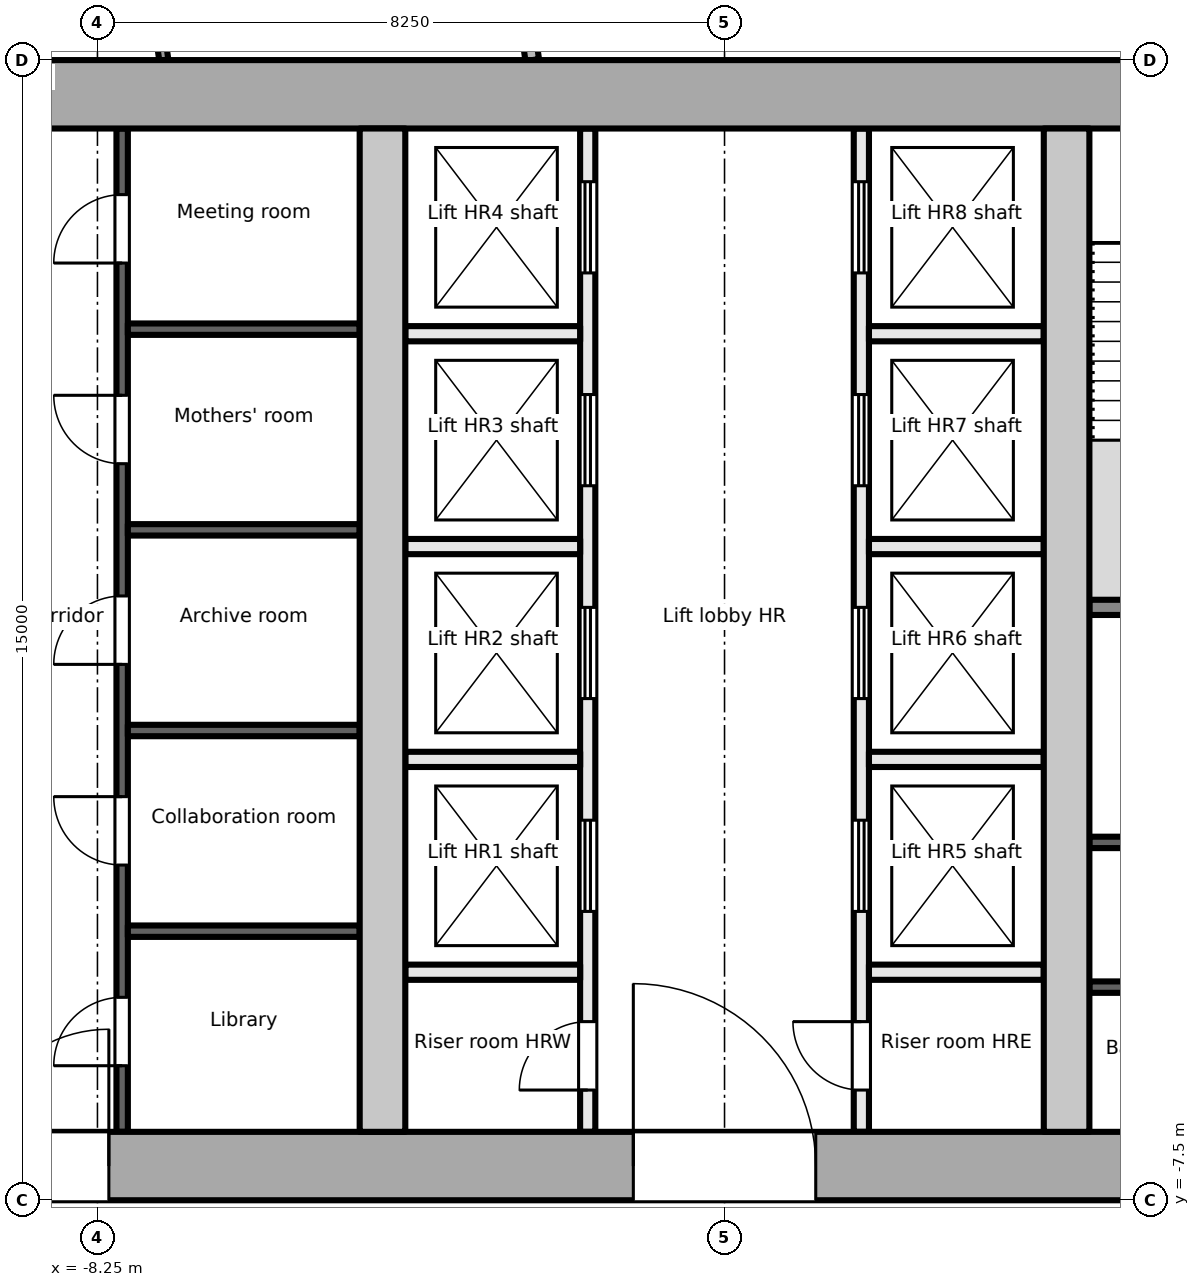
"""IFC4 building model, lengths in metres.
Left out: names, types, materials, properties, quantities, classifications, styles, units other than length and angle.
Written with IfcOpenShell. Run it as: python <this file> out.ifc"""

import sys

from ifc_helpers import new_model, si_unit, direction, frame, frame_2d, origin, place, context, subcontext, project, spatial, rectangle, extrude, element, fill, save


model = new_model("IFC4")
c1 = context("Model", 3, precision=1e-05, world=origin(), true_north=direction((0.0, 1.0)))
c2 = subcontext(c1, "Body", "Model", "MODEL_VIEW")
j1 = project(units=[si_unit("LENGTHUNIT", "METRE"), si_unit("PLANEANGLEUNIT", "RADIAN")], contexts=[c1])
p1 = place(None, origin())
s1 = spatial("IfcSite", under=j1, at=p1, CompositionType="ELEMENT")
p2 = place(p1, origin())
s2 = spatial("IfcBuilding", under=s1, at=p2, CompositionType="ELEMENT")
p3 = place(p2, frame((0.0, 0.0, 225.2)))
s3 = spatial("IfcBuildingStorey", under=s2, at=p3, CompositionType="ELEMENT", Elevation=225.2)
p4 = place(p3, frame((-18.0, -7.05, -0.2), z_axis=(0.0, 0.0, 1.0), x_axis=(1.0, 0.0, 0.0)))
e1 = element("IfcWall", 1, at=p4, inside=s3, PredefinedType="SHEAR", context=c2, shape_type="SweptSolid", body=[
    extrude(rectangle(XDim=36.0, YDim=0.9, at=frame_2d((18.0, 0.0))), origin(), (0.0, 0.0, 1.0), 3.9),
])
p5 = place(p4, frame((8.1, 0.0, 0.2)))
e2 = element("IfcOpeningElement", 2, at=p5, cuts=e1, PredefinedType="OPENING", context=c2, shape_type="SweptSolid", body=[
    extrude(rectangle(XDim=1.8, YDim=2.1, at=frame_2d((0.9, 1.05))), frame((0.0, 0.46, 0.0), z_axis=(0.0, -1.0, 0.0), x_axis=(1.0, 0.0, 0.0)), (0.0, 0.0, 1.0), 0.921),
])
p6 = place(p4, frame((16.8, 0.0, 0.2)))
e3 = element("IfcOpeningElement", 3, at=p6, cuts=e1, PredefinedType="OPENING", context=c2, shape_type="SweptSolid", body=[
    extrude(rectangle(XDim=2.4, YDim=2.1, at=frame_2d((1.2, 1.05))), frame((0.0, 0.46, 0.0), z_axis=(0.0, -1.0, 0.0), x_axis=(1.0, 0.0, 0.0)), (0.0, 0.0, 1.0), 0.921),
])
p7 = place(p4, frame((26.1, 0.0, 0.2)))
e4 = element("IfcOpeningElement", 4, at=p7, cuts=e1, PredefinedType="OPENING", context=c2, shape_type="SweptSolid", body=[
    extrude(rectangle(XDim=2.4, YDim=2.1, at=frame_2d((1.2, 1.05))), frame((0.0, 0.46, 0.0), z_axis=(0.0, -1.0, 0.0), x_axis=(1.0, 0.0, 0.0)), (0.0, 0.0, 1.0), 0.921),
])
p8 = place(p3, frame((-18.0, 7.05, -0.2), z_axis=(0.0, 0.0, 1.0), x_axis=(1.0, 0.0, 0.0)))
e5 = element("IfcWall", 5, at=p8, inside=s3, PredefinedType="SHEAR", context=c2, shape_type="SweptSolid", body=[
    extrude(rectangle(XDim=36.0, YDim=0.9, at=frame_2d((18.0, 0.0))), origin(), (0.0, 0.0, 1.0), 3.9),
])
for number, where, z_axis, x_axis in (
    (6, (-4.5, -6.6, -0.2), (0.0, 0.0, 1.0), (0.0, 1.0, 0.0)),
    (7, (4.5, -6.6, -0.2), (0.0, 0.0, 1.0), (0.0, 1.0, 0.0)),
):
    element("IfcWall", number, at=place(p3, frame(where, z_axis=z_axis, x_axis=x_axis)), inside=s3, PredefinedType="SHEAR", context=c2, shape_type="SweptSolid", body=[
        extrude(rectangle(XDim=13.2, YDim=0.6, at=frame_2d((6.6, 0.0))), origin(), (0.0, 0.0, 1.0), 3.9),
    ])
p9 = place(p3, frame((-7.925, -6.6, 0.0), z_axis=(0.0, 0.0, 1.0), x_axis=(0.0, 1.0, 0.0)))
e8 = element("IfcWall", 8, at=p9, inside=s3, PredefinedType="PARTITIONING", context=c2, shape_type="SweptSolid", body=[
    extrude(rectangle(XDim=13.2, YDim=0.15, at=frame_2d((6.6, 0.0))), origin(), (0.0, 0.0, 1.0), 3.7),
])
p10 = place(p9, frame((0.87, 0.0, 0.0)))
e9 = element("IfcOpeningElement", 9, at=p10, cuts=e8, PredefinedType="OPENING", context=c2, shape_type="SweptSolid", body=[
    extrude(rectangle(XDim=0.9, YDim=2.1, at=frame_2d((0.45, 1.05))), frame((0.0, 0.085, 0.0), z_axis=(0.0, -1.0, 0.0), x_axis=(1.0, 0.0, 0.0)), (0.0, 0.0, 1.0), 0.171),
])
p11 = place(p9, frame((3.51, 0.0, 0.0)))
e10 = element("IfcOpeningElement", 10, at=p11, cuts=e8, PredefinedType="OPENING", context=c2, shape_type="SweptSolid", body=[
    extrude(rectangle(XDim=0.9, YDim=2.1, at=frame_2d((0.45, 1.05))), frame((0.0, 0.085, 0.0), z_axis=(0.0, -1.0, 0.0), x_axis=(1.0, 0.0, 0.0)), (0.0, 0.0, 1.0), 0.171),
])
p12 = place(p9, frame((6.15, 0.0, 0.0)))
e11 = element("IfcOpeningElement", 11, at=p12, cuts=e8, PredefinedType="OPENING", context=c2, shape_type="SweptSolid", body=[
    extrude(rectangle(XDim=0.9, YDim=2.1, at=frame_2d((0.45, 1.05))), frame((0.0, 0.085, 0.0), z_axis=(0.0, -1.0, 0.0), x_axis=(1.0, 0.0, 0.0)), (0.0, 0.0, 1.0), 0.171),
])
p13 = place(p9, frame((8.79, 0.0, 0.0)))
e12 = element("IfcOpeningElement", 12, at=p13, cuts=e8, PredefinedType="OPENING", context=c2, shape_type="SweptSolid", body=[
    extrude(rectangle(XDim=0.9, YDim=2.1, at=frame_2d((0.45, 1.05))), frame((0.0, 0.085, 0.0), z_axis=(0.0, -1.0, 0.0), x_axis=(1.0, 0.0, 0.0)), (0.0, 0.0, 1.0), 0.171),
])
p14 = place(p9, frame((11.43, 0.0, 0.0)))
e13 = element("IfcOpeningElement", 13, at=p14, cuts=e8, PredefinedType="OPENING", context=c2, shape_type="SweptSolid", body=[
    extrude(rectangle(XDim=0.9, YDim=2.1, at=frame_2d((0.45, 1.05))), frame((0.0, 0.085, 0.0), z_axis=(0.0, -1.0, 0.0), x_axis=(1.0, 0.0, 0.0)), (0.0, 0.0, 1.0), 0.171),
])
for number, where, z_axis, x_axis in (
    (14, (-7.85, -3.96, 0.0), (0.0, 0.0, 1.0), (1.0, 0.0, 0.0)),
    (15, (-7.85, -1.32, 0.0), (0.0, 0.0, 1.0), (1.0, 0.0, 0.0)),
    (16, (-7.85, 1.32, 0.0), (0.0, 0.0, 1.0), (1.0, 0.0, 0.0)),
    (17, (-7.85, 3.96, 0.0), (0.0, 0.0, 1.0), (1.0, 0.0, 0.0)),
):
    element("IfcWall", number, at=place(p3, frame(where, z_axis=z_axis, x_axis=x_axis)), inside=s3, PredefinedType="PARTITIONING", context=c2, shape_type="SweptSolid", body=[
        extrude(rectangle(XDim=3.05, YDim=0.15, at=frame_2d((1.525, 0.0))), origin(), (0.0, 0.0, 1.0), 3.7),
    ])
p15 = place(p3, frame((-1.8, -6.6, 0.0), z_axis=(0.0, 0.0, 1.0), x_axis=(0.0, 1.0, 0.0)))
e18 = element("IfcWall", 18, at=p15, inside=s3, PredefinedType="PARTITIONING", context=c2, shape_type="SweptSolid", body=[
    extrude(rectangle(XDim=13.2, YDim=0.2, at=frame_2d((6.6, 0.0))), origin(), (0.0, 0.0, 1.0), 3.7),
])
p16 = place(p15, frame((0.55, 0.0, 0.0)))
e19 = element("IfcOpeningElement", 19, at=p16, cuts=e18, PredefinedType="OPENING", context=c2, shape_type="SweptSolid", body=[
    extrude(rectangle(XDim=0.9, YDim=2.1, at=frame_2d((0.45, 1.05))), frame((0.0, 0.111, 0.0), z_axis=(0.0, -1.0, 0.0), x_axis=(1.0, 0.0, 0.0)), (0.0, 0.0, 1.0), 0.221),
])
p17 = place(p15, frame((2.9, 0.0, 0.0)))
e20 = element("IfcOpeningElement", 20, at=p17, cuts=e18, PredefinedType="OPENING", context=c2, shape_type="SweptSolid", body=[
    extrude(rectangle(XDim=1.2, YDim=2.1, at=frame_2d((0.6, 1.05))), frame((0.0, 0.111, 0.0), z_axis=(0.0, -1.0, 0.0), x_axis=(1.0, 0.0, 0.0)), (0.0, 0.0, 1.0), 0.221),
])
p18 = place(p15, frame((5.7, 0.0, 0.0)))
e21 = element("IfcOpeningElement", 21, at=p18, cuts=e18, PredefinedType="OPENING", context=c2, shape_type="SweptSolid", body=[
    extrude(rectangle(XDim=1.2, YDim=2.1, at=frame_2d((0.6, 1.05))), frame((0.0, 0.111, 0.0), z_axis=(0.0, -1.0, 0.0), x_axis=(1.0, 0.0, 0.0)), (0.0, 0.0, 1.0), 0.221),
])
p19 = place(p15, frame((8.5, 0.0, 0.0)))
e22 = element("IfcOpeningElement", 22, at=p19, cuts=e18, PredefinedType="OPENING", context=c2, shape_type="SweptSolid", body=[
    extrude(rectangle(XDim=1.2, YDim=2.1, at=frame_2d((0.6, 1.05))), frame((0.0, 0.111, 0.0), z_axis=(0.0, -1.0, 0.0), x_axis=(1.0, 0.0, 0.0)), (0.0, 0.0, 1.0), 0.221),
])
p20 = place(p15, frame((11.3, 0.0, 0.0)))
e23 = element("IfcOpeningElement", 23, at=p20, cuts=e18, PredefinedType="OPENING", context=c2, shape_type="SweptSolid", body=[
    extrude(rectangle(XDim=1.2, YDim=2.1, at=frame_2d((0.6, 1.05))), frame((0.0, 0.111, 0.0), z_axis=(0.0, -1.0, 0.0), x_axis=(1.0, 0.0, 0.0)), (0.0, 0.0, 1.0), 0.221),
])
p21 = place(p3, frame((1.8, -6.6, 0.0), z_axis=(0.0, 0.0, 1.0), x_axis=(0.0, 1.0, 0.0)))
e24 = element("IfcWall", 24, at=p21, inside=s3, PredefinedType="PARTITIONING", context=c2, shape_type="SweptSolid", body=[
    extrude(rectangle(XDim=13.2, YDim=0.2, at=frame_2d((6.6, 0.0))), origin(), (0.0, 0.0, 1.0), 3.7),
])
p22 = place(p21, frame((0.55, 0.0, 0.0)))
e25 = element("IfcOpeningElement", 25, at=p22, cuts=e24, PredefinedType="OPENING", context=c2, shape_type="SweptSolid", body=[
    extrude(rectangle(XDim=0.9, YDim=2.1, at=frame_2d((0.45, 1.05))), frame((0.0, 0.111, 0.0), z_axis=(0.0, -1.0, 0.0), x_axis=(1.0, 0.0, 0.0)), (0.0, 0.0, 1.0), 0.221),
])
p23 = place(p21, frame((2.9, 0.0, 0.0)))
e26 = element("IfcOpeningElement", 26, at=p23, cuts=e24, PredefinedType="OPENING", context=c2, shape_type="SweptSolid", body=[
    extrude(rectangle(XDim=1.2, YDim=2.1, at=frame_2d((0.6, 1.05))), frame((0.0, 0.111, 0.0), z_axis=(0.0, -1.0, 0.0), x_axis=(1.0, 0.0, 0.0)), (0.0, 0.0, 1.0), 0.221),
])
p24 = place(p21, frame((5.7, 0.0, 0.0)))
e27 = element("IfcOpeningElement", 27, at=p24, cuts=e24, PredefinedType="OPENING", context=c2, shape_type="SweptSolid", body=[
    extrude(rectangle(XDim=1.2, YDim=2.1, at=frame_2d((0.6, 1.05))), frame((0.0, 0.111, 0.0), z_axis=(0.0, -1.0, 0.0), x_axis=(1.0, 0.0, 0.0)), (0.0, 0.0, 1.0), 0.221),
])
p25 = place(p21, frame((8.5, 0.0, 0.0)))
e28 = element("IfcOpeningElement", 28, at=p25, cuts=e24, PredefinedType="OPENING", context=c2, shape_type="SweptSolid", body=[
    extrude(rectangle(XDim=1.2, YDim=2.1, at=frame_2d((0.6, 1.05))), frame((0.0, 0.111, 0.0), z_axis=(0.0, -1.0, 0.0), x_axis=(1.0, 0.0, 0.0)), (0.0, 0.0, 1.0), 0.221),
])
p26 = place(p21, frame((11.3, 0.0, 0.0)))
e29 = element("IfcOpeningElement", 29, at=p26, cuts=e24, PredefinedType="OPENING", context=c2, shape_type="SweptSolid", body=[
    extrude(rectangle(XDim=1.2, YDim=2.1, at=frame_2d((0.6, 1.05))), frame((0.0, 0.111, 0.0), z_axis=(0.0, -1.0, 0.0), x_axis=(1.0, 0.0, 0.0)), (0.0, 0.0, 1.0), 0.221),
])
for number, where, z_axis, x_axis in (
    (30, (-4.2, -1.7, 0.0), (0.0, 0.0, 1.0), (1.0, 0.0, 0.0)),
    (31, (-4.2, 1.1, 0.0), (0.0, 0.0, 1.0), (1.0, 0.0, 0.0)),
    (32, (-4.2, 3.9, 0.0), (0.0, 0.0, 1.0), (1.0, 0.0, 0.0)),
    (33, (-4.2, -4.5, 0.0), (0.0, 0.0, 1.0), (1.0, 0.0, 0.0)),
    (34, (1.9, -1.7, 0.0), (0.0, 0.0, 1.0), (1.0, 0.0, 0.0)),
    (35, (1.9, 1.1, 0.0), (0.0, 0.0, 1.0), (1.0, 0.0, 0.0)),
    (36, (1.9, 3.9, 0.0), (0.0, 0.0, 1.0), (1.0, 0.0, 0.0)),
    (37, (1.9, -4.5, 0.0), (0.0, 0.0, 1.0), (1.0, 0.0, 0.0)),
):
    element("IfcWall", number, at=place(p3, frame(where, z_axis=z_axis, x_axis=x_axis)), inside=s3, PredefinedType="PARTITIONING", context=c2, shape_type="SweptSolid", body=[
        extrude(rectangle(XDim=2.3, YDim=0.2, at=frame_2d((1.15, 0.0))), origin(), (0.0, 0.0, 1.0), 3.7),
    ])
p27 = place(p3, frame((4.8, 0.3, 0.0), z_axis=(0.0, 0.0, 1.0), x_axis=(1.0, 0.0, 0.0)))
e38 = element("IfcWall", 38, at=p27, inside=s3, PredefinedType="PARTITIONING", context=c2, shape_type="SweptSolid", body=[
    extrude(rectangle(XDim=3.15, YDim=0.2, at=frame_2d((1.575, 0.0))), origin(), (0.0, 0.0, 1.0), 3.7),
])
for number, where, z_axis, x_axis in (
    (39, (4.8, -4.696, 0.0), (0.0, 0.0, 1.0), (1.0, 0.0, 0.0)),
    (40, (4.8, -2.792, 0.0), (0.0, 0.0, 1.0), (1.0, 0.0, 0.0)),
):
    element("IfcWall", number, at=place(p3, frame(where, z_axis=z_axis, x_axis=x_axis)), inside=s3, PredefinedType="PARTITIONING", context=c2, shape_type="SweptSolid", body=[
        extrude(rectangle(XDim=3.15, YDim=0.15, at=frame_2d((1.575, 0.0))), origin(), (0.0, 0.0, 1.0), 3.7),
    ])
p28 = place(p3, frame((-7.895, 11.188, 0.0), z_axis=(0.0, 0.0, 1.0), x_axis=(0.139108182039, -0.990277190331, 0.0)))
e41 = element("IfcWall", 41, at=p28, inside=s3, PredefinedType="PARTITIONING", context=c2, shape_type="SweptSolid", body=[
    extrude(rectangle(XDim=3.724, YDim=0.12, at=frame_2d((1.862, 0.0))), origin(), (0.0, 0.0, 1.0), 3.7),
])
p29 = place(p28, frame((1.412, 0.0, 0.0)))
e42 = element("IfcOpeningElement", 42, at=p29, cuts=e41, PredefinedType="OPENING", context=c2, shape_type="SweptSolid", body=[
    extrude(rectangle(XDim=0.9, YDim=2.1, at=frame_2d((0.45, 1.05))), frame((0.0, 0.071, 0.0), z_axis=(0.0, -1.0, 0.0), x_axis=(1.0, 0.0, 0.0)), (0.0, 0.0, 1.0), 0.141),
])
p30 = place(p3, frame((-2.632, 8.23, 0.0), z_axis=(0.0, 0.0, 1.0), x_axis=(0.138452925943, -0.99036901572, 0.0)))
e43 = element("IfcWall", 43, at=p30, inside=s3, PredefinedType="PARTITIONING", context=c2, shape_type="SweptSolid", body=[
    extrude(rectangle(XDim=0.737, YDim=0.18, at=frame_2d((0.369, 0.0))), origin(), (0.0, 0.0, 1.0), 3.7),
])
p31 = place(p10, origin())
e44 = element("IfcDoor", 44, at=p31, inside=s3, OperationType="SINGLE_SWING_LEFT", PredefinedType="DOOR", context=c2, shape_type="SweptSolid", body=[
    extrude(rectangle(XDim=0.9, YDim=2.1, at=frame_2d((0.45, 1.05))), frame((0.0, 0.025, 0.0), z_axis=(0.0, -1.0, 0.0), x_axis=(1.0, 0.0, 0.0)), (0.0, 0.0, 1.0), 0.05),
])
fill(e9, e44)
p32 = place(p11, origin())
e45 = element("IfcDoor", 45, at=p32, inside=s3, OperationType="SINGLE_SWING_RIGHT", PredefinedType="DOOR", context=c2, shape_type="SweptSolid", body=[
    extrude(rectangle(XDim=0.9, YDim=2.1, at=frame_2d((0.45, 1.05))), frame((0.0, 0.025, 0.0), z_axis=(0.0, -1.0, 0.0), x_axis=(1.0, 0.0, 0.0)), (0.0, 0.0, 1.0), 0.05),
])
fill(e10, e45)
p33 = place(p12, origin())
e46 = element("IfcDoor", 46, at=p33, inside=s3, OperationType="SINGLE_SWING_LEFT", PredefinedType="DOOR", context=c2, shape_type="SweptSolid", body=[
    extrude(rectangle(XDim=0.9, YDim=2.1, at=frame_2d((0.45, 1.05))), frame((0.0, 0.025, 0.0), z_axis=(0.0, -1.0, 0.0), x_axis=(1.0, 0.0, 0.0)), (0.0, 0.0, 1.0), 0.05),
])
fill(e11, e46)
p34 = place(p13, origin())
e47 = element("IfcDoor", 47, at=p34, inside=s3, OperationType="SINGLE_SWING_RIGHT", PredefinedType="DOOR", context=c2, shape_type="SweptSolid", body=[
    extrude(rectangle(XDim=0.9, YDim=2.1, at=frame_2d((0.45, 1.05))), frame((0.0, 0.025, 0.0), z_axis=(0.0, -1.0, 0.0), x_axis=(1.0, 0.0, 0.0)), (0.0, 0.0, 1.0), 0.05),
])
fill(e12, e47)
p35 = place(p14, origin())
e48 = element("IfcDoor", 48, at=p35, inside=s3, OperationType="SINGLE_SWING_LEFT", PredefinedType="DOOR", context=c2, shape_type="SweptSolid", body=[
    extrude(rectangle(XDim=0.9, YDim=2.1, at=frame_2d((0.45, 1.05))), frame((0.0, 0.025, 0.0), z_axis=(0.0, -1.0, 0.0), x_axis=(1.0, 0.0, 0.0)), (0.0, 0.0, 1.0), 0.05),
])
fill(e13, e48)
p36 = place(p5, origin())
e49 = element("IfcDoor", 49, at=p36, inside=s3, OperationType="SINGLE_SWING_RIGHT", PredefinedType="DOOR", context=c2, shape_type="SweptSolid", body=[
    extrude(rectangle(XDim=1.8, YDim=2.1, at=frame_2d((0.9, 1.05))), frame((0.0, 0.025, 0.0), z_axis=(0.0, -1.0, 0.0), x_axis=(1.0, 0.0, 0.0)), (0.0, 0.0, 1.0), 0.05),
])
fill(e2, e49)
p37 = place(p16, origin())
e50 = element("IfcDoor", 50, at=p37, inside=s3, OperationType="SINGLE_SWING_LEFT", PredefinedType="DOOR", context=c2, shape_type="SweptSolid", body=[
    extrude(rectangle(XDim=0.9, YDim=2.1, at=frame_2d((0.45, 1.05))), frame((0.0, 0.025, 0.0), z_axis=(0.0, -1.0, 0.0), x_axis=(1.0, 0.0, 0.0)), (0.0, 0.0, 1.0), 0.05),
])
fill(e19, e50)
p38 = place(p17, origin())
e51 = element("IfcDoor", 51, at=p38, inside=s3, OperationType="DOUBLE_DOOR_SLIDING", PredefinedType="DOOR", context=c2, shape_type="SweptSolid", body=[
    extrude(rectangle(XDim=1.2, YDim=2.1, at=frame_2d((0.6, 1.05))), frame((0.0, 0.025, 0.0), z_axis=(0.0, -1.0, 0.0), x_axis=(1.0, 0.0, 0.0)), (0.0, 0.0, 1.0), 0.05),
])
fill(e20, e51)
p39 = place(p18, origin())
e52 = element("IfcDoor", 52, at=p39, inside=s3, OperationType="DOUBLE_DOOR_SLIDING", PredefinedType="DOOR", context=c2, shape_type="SweptSolid", body=[
    extrude(rectangle(XDim=1.2, YDim=2.1, at=frame_2d((0.6, 1.05))), frame((0.0, 0.025, 0.0), z_axis=(0.0, -1.0, 0.0), x_axis=(1.0, 0.0, 0.0)), (0.0, 0.0, 1.0), 0.05),
])
fill(e21, e52)
p40 = place(p19, origin())
e53 = element("IfcDoor", 53, at=p40, inside=s3, OperationType="DOUBLE_DOOR_SLIDING", PredefinedType="DOOR", context=c2, shape_type="SweptSolid", body=[
    extrude(rectangle(XDim=1.2, YDim=2.1, at=frame_2d((0.6, 1.05))), frame((0.0, 0.025, 0.0), z_axis=(0.0, -1.0, 0.0), x_axis=(1.0, 0.0, 0.0)), (0.0, 0.0, 1.0), 0.05),
])
fill(e22, e53)
p41 = place(p20, origin())
e54 = element("IfcDoor", 54, at=p41, inside=s3, OperationType="DOUBLE_DOOR_SLIDING", PredefinedType="DOOR", context=c2, shape_type="SweptSolid", body=[
    extrude(rectangle(XDim=1.2, YDim=2.1, at=frame_2d((0.6, 1.05))), frame((0.0, 0.025, 0.0), z_axis=(0.0, -1.0, 0.0), x_axis=(1.0, 0.0, 0.0)), (0.0, 0.0, 1.0), 0.05),
])
fill(e23, e54)
p42 = place(p22, origin())
e55 = element("IfcDoor", 55, at=p42, inside=s3, OperationType="SINGLE_SWING_RIGHT", PredefinedType="DOOR", context=c2, shape_type="SweptSolid", body=[
    extrude(rectangle(XDim=0.9, YDim=2.1, at=frame_2d((0.45, 1.05))), frame((0.0, 0.025, 0.0), z_axis=(0.0, -1.0, 0.0), x_axis=(1.0, 0.0, 0.0)), (0.0, 0.0, 1.0), 0.05),
])
fill(e25, e55)
p43 = place(p23, origin())
e56 = element("IfcDoor", 56, at=p43, inside=s3, OperationType="DOUBLE_DOOR_SLIDING", PredefinedType="DOOR", context=c2, shape_type="SweptSolid", body=[
    extrude(rectangle(XDim=1.2, YDim=2.1, at=frame_2d((0.6, 1.05))), frame((0.0, 0.025, 0.0), z_axis=(0.0, -1.0, 0.0), x_axis=(1.0, 0.0, 0.0)), (0.0, 0.0, 1.0), 0.05),
])
fill(e26, e56)
p44 = place(p24, origin())
e57 = element("IfcDoor", 57, at=p44, inside=s3, OperationType="DOUBLE_DOOR_SLIDING", PredefinedType="DOOR", context=c2, shape_type="SweptSolid", body=[
    extrude(rectangle(XDim=1.2, YDim=2.1, at=frame_2d((0.6, 1.05))), frame((0.0, 0.025, 0.0), z_axis=(0.0, -1.0, 0.0), x_axis=(1.0, 0.0, 0.0)), (0.0, 0.0, 1.0), 0.05),
])
fill(e27, e57)
p45 = place(p25, origin())
e58 = element("IfcDoor", 58, at=p45, inside=s3, OperationType="DOUBLE_DOOR_SLIDING", PredefinedType="DOOR", context=c2, shape_type="SweptSolid", body=[
    extrude(rectangle(XDim=1.2, YDim=2.1, at=frame_2d((0.6, 1.05))), frame((0.0, 0.025, 0.0), z_axis=(0.0, -1.0, 0.0), x_axis=(1.0, 0.0, 0.0)), (0.0, 0.0, 1.0), 0.05),
])
fill(e28, e58)
p46 = place(p26, origin())
e59 = element("IfcDoor", 59, at=p46, inside=s3, OperationType="DOUBLE_DOOR_SLIDING", PredefinedType="DOOR", context=c2, shape_type="SweptSolid", body=[
    extrude(rectangle(XDim=1.2, YDim=2.1, at=frame_2d((0.6, 1.05))), frame((0.0, 0.025, 0.0), z_axis=(0.0, -1.0, 0.0), x_axis=(1.0, 0.0, 0.0)), (0.0, 0.0, 1.0), 0.05),
])
fill(e29, e59)
p47 = place(p6, origin())
e60 = element("IfcDoor", 60, at=p47, inside=s3, OperationType="DOUBLE_DOOR_DOUBLE_SWING", PredefinedType="DOOR", context=c2, shape_type="SweptSolid", body=[
    extrude(rectangle(XDim=2.4, YDim=2.1, at=frame_2d((1.2, 1.05))), frame((0.0, 0.025, 0.0), z_axis=(0.0, -1.0, 0.0), x_axis=(1.0, 0.0, 0.0)), (0.0, 0.0, 1.0), 0.05),
])
fill(e3, e60)
save(model, sys.argv[1])
